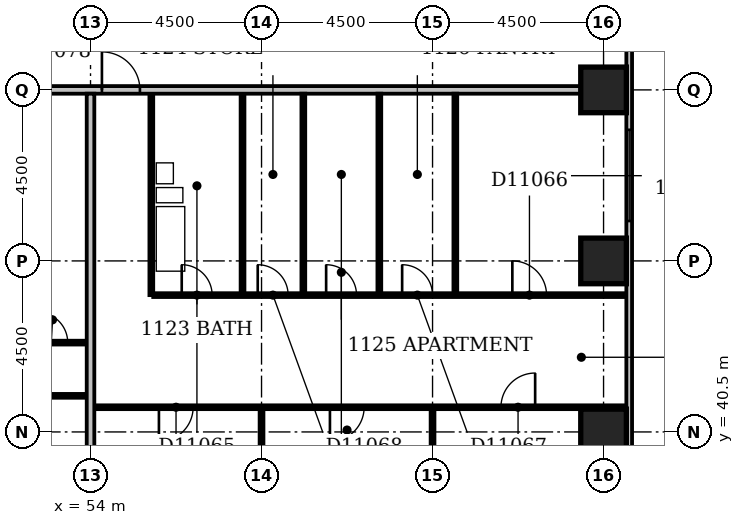
"""IFC4 building model, lengths in metres.
Left out: names, types, materials, properties, quantities, classifications, styles, units other than length and angle.
Written with IfcOpenShell. Run it as: python <this file> out.ifc"""

import sys

from ifc_helpers import new_model, si_unit, direction, frame, frame_2d, origin, origin_2d, place, context, subcontext, project, spatial, rectangle, extrude, element, fill, save


model = new_model("IFC4")
c1 = context("Model", 3, precision=1e-05, world=origin(), true_north=direction((0.0, 1.0)))
c2 = subcontext(c1, "Body", "Model", "MODEL_VIEW")
j1 = project(units=[si_unit("LENGTHUNIT", "METRE"), si_unit("PLANEANGLEUNIT", "RADIAN")], contexts=[c1])
p1 = place(None, origin())
s1 = spatial("IfcSite", under=j1, at=p1, CompositionType="ELEMENT")
p2 = place(p1, origin())
s2 = spatial("IfcBuilding", under=s1, at=p2, CompositionType="ELEMENT")
p3 = place(p2, frame((0.0, 0.0, 50.6)))
s3 = spatial("IfcBuildingStorey", under=s2, at=p3, CompositionType="ELEMENT", Elevation=50.6)
for number, where, z_axis, x_axis in (
    (1, (67.5, 40.5, -0.3), (0.0, 0.0, 1.0), (1.0, 0.0, 0.0)),
    (2, (67.5, 45.0, -0.3), (0.0, 0.0, 1.0), (1.0, 0.0, 0.0)),
    (3, (67.5, 49.5, -0.3), (0.0, 0.0, 1.0), (1.0, 0.0, 0.0)),
):
    element("IfcColumn", number, at=place(p3, frame(where, z_axis=z_axis, x_axis=x_axis)), inside=s3, PredefinedType="COLUMN", context=c2, shape_type="SweptSolid", body=[
        extrude(rectangle(XDim=1.2, YDim=1.2, at=origin_2d()), origin(), (0.0, 0.0, 1.0), 3.6),
    ])
p4 = place(p3, frame((68.175, 35.4, 0.0), z_axis=(0.0, 0.0, 1.0), x_axis=(0.0, 1.0, 0.0)))
e4 = element("IfcWall", 4, at=p4, inside=s3, PredefinedType="STANDARD", context=c2, shape_type="SweptSolid", body=[
    extrude(rectangle(XDim=23.85, YDim=0.15, at=frame_2d((11.925, 0.0))), origin(), (0.0, 0.0, 1.0), 2.7),
])
p5 = place(p4, frame((2.977, 0.0, 0.6)))
e5 = element("IfcOpeningElement", 5, at=p5, cuts=e4, PredefinedType="OPENING", context=c2, shape_type="SweptSolid", body=[
    extrude(rectangle(XDim=1.2, YDim=1.8, at=frame_2d((0.6, 0.9))), frame((0.0, 0.087, 0.0), z_axis=(0.0, -1.0, 0.0), x_axis=(1.0, 0.0, 0.0)), (0.0, 0.0, 1.0), 0.174),
])
p6 = place(p4, frame((10.65, 0.0, 0.6)))
e6 = element("IfcOpeningElement", 6, at=p6, cuts=e4, PredefinedType="OPENING", context=c2, shape_type="SweptSolid", body=[
    extrude(rectangle(XDim=2.4, YDim=1.8, at=frame_2d((1.2, 0.9))), frame((0.0, 0.087, 0.0), z_axis=(0.0, -1.0, 0.0), x_axis=(1.0, 0.0, 0.0)), (0.0, 0.0, 1.0), 0.174),
])
p7 = place(p4, frame((19.545, 0.0, 0.6)))
e7 = element("IfcOpeningElement", 7, at=p7, cuts=e4, PredefinedType="OPENING", context=c2, shape_type="SweptSolid", body=[
    extrude(rectangle(XDim=1.8, YDim=1.8, at=frame_2d((0.9, 0.9))), frame((0.0, 0.087, 0.0), z_axis=(0.0, -1.0, 0.0), x_axis=(1.0, 0.0, 0.0)), (0.0, 0.0, 1.0), 0.174),
])
p8 = place(p3, frame((54.0, 36.6, 0.0), z_axis=(0.0, 0.0, 1.0), x_axis=(0.0, 1.0, 0.0)))
e8 = element("IfcWall", 8, at=p8, inside=s3, PredefinedType="PARTITIONING", context=c2, shape_type="SweptSolid", body=[
    extrude(rectangle(XDim=12.8, YDim=0.2, at=frame_2d((6.4, 0.0))), origin(), (0.0, 0.0, 1.0), 2.6),
])
p9 = place(p3, frame((58.5, 36.6, 0.0), z_axis=(0.0, 0.0, 1.0), x_axis=(0.0, 1.0, 0.0)))
e9 = element("IfcWall", 9, at=p9, inside=s3, PredefinedType="PARTITIONING", context=c2, shape_type="SweptSolid", body=[
    extrude(rectangle(XDim=4.5, YDim=0.1, at=frame_2d((2.25, 0.0))), origin(), (0.0, 0.0, 1.0), 3.3),
])
p10 = place(p3, frame((63.0, 36.6, 0.0), z_axis=(0.0, 0.0, 1.0), x_axis=(0.0, 1.0, 0.0)))
e10 = element("IfcWall", 10, at=p10, inside=s3, PredefinedType="PARTITIONING", context=c2, shape_type="SweptSolid", body=[
    extrude(rectangle(XDim=4.5, YDim=0.1, at=frame_2d((2.25, 0.0))), origin(), (0.0, 0.0, 1.0), 2.4),
])
p11 = place(p3, frame((54.1, 41.15, 0.0), z_axis=(0.0, 0.0, 1.0), x_axis=(1.0, 0.0, 0.0)))
e11 = element("IfcWall", 11, at=p11, inside=s3, PredefinedType="PARTITIONING", context=c2, shape_type="SweptSolid", body=[
    extrude(rectangle(XDim=14.0, YDim=0.1, at=frame_2d((7.0, 0.0))), origin(), (0.0, 0.0, 1.0), 3.3),
])
p12 = place(p11, frame((1.7, 0.0, 0.0)))
e12 = element("IfcOpeningElement", 12, at=p12, cuts=e11, PredefinedType="OPENING", context=c2, shape_type="SweptSolid", body=[
    extrude(rectangle(XDim=0.9, YDim=2.1, at=frame_2d((0.45, 1.05))), frame((0.0, 0.062, 0.0), z_axis=(0.0, -1.0, 0.0), x_axis=(1.0, 0.0, 0.0)), (0.0, 0.0, 1.0), 0.124),
])
p13 = place(p11, frame((6.2, 0.0, 0.0)))
e13 = element("IfcOpeningElement", 13, at=p13, cuts=e11, PredefinedType="OPENING", context=c2, shape_type="SweptSolid", body=[
    extrude(rectangle(XDim=0.9, YDim=2.1, at=frame_2d((0.45, 1.05))), frame((0.0, 0.062, 0.0), z_axis=(0.0, -1.0, 0.0), x_axis=(1.0, 0.0, 0.0)), (0.0, 0.0, 1.0), 0.124),
])
p14 = place(p11, frame((10.7, 0.0, 0.0)))
e14 = element("IfcOpeningElement", 14, at=p14, cuts=e11, PredefinedType="OPENING", context=c2, shape_type="SweptSolid", body=[
    extrude(rectangle(XDim=0.9, YDim=2.1, at=frame_2d((0.45, 1.05))), frame((0.0, 0.062, 0.0), z_axis=(0.0, -1.0, 0.0), x_axis=(1.0, 0.0, 0.0)), (0.0, 0.0, 1.0), 0.124),
])
p15 = place(p3, frame((40.6, 41.45, 0.0), z_axis=(0.0, 0.0, 1.0), x_axis=(1.0, 0.0, 0.0)))
e15 = element("IfcWall", 15, at=p15, inside=s3, PredefinedType="PARTITIONING", context=c2, shape_type="SweptSolid", body=[
    extrude(rectangle(XDim=13.3, YDim=0.1, at=frame_2d((6.65, 0.0))), origin(), (0.0, 0.0, 1.0), 3.3),
])
p16 = place(p15, frame((1.7, 0.0, 0.0)))
e16 = element("IfcOpeningElement", 16, at=p16, cuts=e15, PredefinedType="OPENING", context=c2, shape_type="SweptSolid", body=[
    extrude(rectangle(XDim=0.9, YDim=2.1, at=frame_2d((0.45, 1.05))), frame((0.0, 0.062, 0.0), z_axis=(0.0, -1.0, 0.0), x_axis=(1.0, 0.0, 0.0)), (0.0, 0.0, 1.0), 0.124),
])
p17 = place(p15, frame((6.2, 0.0, 0.0)))
e17 = element("IfcOpeningElement", 17, at=p17, cuts=e15, PredefinedType="OPENING", context=c2, shape_type="SweptSolid", body=[
    extrude(rectangle(XDim=0.9, YDim=2.1, at=frame_2d((0.45, 1.05))), frame((0.0, 0.062, 0.0), z_axis=(0.0, -1.0, 0.0), x_axis=(1.0, 0.0, 0.0)), (0.0, 0.0, 1.0), 0.124),
])
p18 = place(p15, frame((10.7, 0.0, 0.0)))
e18 = element("IfcOpeningElement", 18, at=p18, cuts=e15, PredefinedType="OPENING", context=c2, shape_type="SweptSolid", body=[
    extrude(rectangle(XDim=0.9, YDim=2.1, at=frame_2d((0.45, 1.05))), frame((0.0, 0.062, 0.0), z_axis=(0.0, -1.0, 0.0), x_axis=(1.0, 0.0, 0.0)), (0.0, 0.0, 1.0), 0.124),
])
p19 = place(p3, frame((50.45, 42.85, 0.0), z_axis=(0.0, 0.0, 1.0), x_axis=(1.0, 0.0, 0.0)))
e19 = element("IfcWall", 19, at=p19, inside=s3, PredefinedType="PARTITIONING", context=c2, shape_type="SweptSolid", body=[
    extrude(rectangle(XDim=3.45, YDim=0.1, at=frame_2d((1.725, 0.0))), origin(), (0.0, 0.0, 1.0), 3.3),
])
p20 = place(p19, frame((0.35, 0.0, 0.0)))
e20 = element("IfcOpeningElement", 20, at=p20, cuts=e19, PredefinedType="OPENING", context=c2, shape_type="SweptSolid", body=[
    extrude(rectangle(XDim=0.8, YDim=2.1, at=frame_2d((0.4, 1.05))), frame((0.0, 0.062, 0.0), z_axis=(0.0, -1.0, 0.0), x_axis=(1.0, 0.0, 0.0)), (0.0, 0.0, 1.0), 0.124),
])
p21 = place(p19, frame((2.15, 0.0, 0.0)))
e21 = element("IfcOpeningElement", 21, at=p21, cuts=e19, PredefinedType="OPENING", context=c2, shape_type="SweptSolid", body=[
    extrude(rectangle(XDim=0.8, YDim=2.1, at=frame_2d((0.4, 1.05))), frame((0.0, 0.062, 0.0), z_axis=(0.0, -1.0, 0.0), x_axis=(1.0, 0.0, 0.0)), (0.0, 0.0, 1.0), 0.124),
])
p22 = place(p3, frame((55.6, 44.1, 0.0), z_axis=(0.0, 0.0, 1.0), x_axis=(0.0, 1.0, 0.0)))
e22 = element("IfcWall", 22, at=p22, inside=s3, PredefinedType="PLUMBINGWALL", context=c2, shape_type="SweptSolid", body=[
    extrude(rectangle(XDim=5.3, YDim=0.1, at=frame_2d((2.65, 0.0))), origin(), (0.0, 0.0, 1.0), 3.3),
])
p23 = place(p3, frame((55.65, 44.1, 0.0), z_axis=(0.0, 0.0, 1.0), x_axis=(1.0, 0.0, 0.0)))
e23 = element("IfcWall", 23, at=p23, inside=s3, PredefinedType="PARTITIONING", context=c2, shape_type="SweptSolid", body=[
    extrude(rectangle(XDim=12.45, YDim=0.1, at=frame_2d((6.225, 0.0))), origin(), (0.0, 0.0, 1.0), 3.3),
])
p24 = place(p23, frame((0.75, 0.0, 0.0)))
e24 = element("IfcOpeningElement", 24, at=p24, cuts=e23, PredefinedType="OPENING", context=c2, shape_type="SweptSolid", body=[
    extrude(rectangle(XDim=0.8, YDim=2.1, at=frame_2d((0.4, 1.05))), frame((0.0, 0.062, 0.0), z_axis=(0.0, -1.0, 0.0), x_axis=(1.0, 0.0, 0.0)), (0.0, 0.0, 1.0), 0.124),
])
p25 = place(p23, frame((9.45, 0.0, 0.0)))
e25 = element("IfcOpeningElement", 25, at=p25, cuts=e23, PredefinedType="OPENING", context=c2, shape_type="SweptSolid", body=[
    extrude(rectangle(XDim=0.9, YDim=2.1, at=frame_2d((0.45, 1.05))), frame((0.0, 0.062, 0.0), z_axis=(0.0, -1.0, 0.0), x_axis=(1.0, 0.0, 0.0)), (0.0, 0.0, 1.0), 0.124),
])
p26 = place(p23, frame((6.55, 0.0, 0.0)))
e26 = element("IfcOpeningElement", 26, at=p26, cuts=e23, PredefinedType="OPENING", context=c2, shape_type="SweptSolid", body=[
    extrude(rectangle(XDim=0.8, YDim=2.1, at=frame_2d((0.4, 1.05))), frame((0.0, 0.062, 0.0), z_axis=(0.0, -1.0, 0.0), x_axis=(1.0, 0.0, 0.0)), (0.0, 0.0, 1.0), 0.124),
])
p27 = place(p23, frame((2.75, 0.0, 0.0)))
e27 = element("IfcOpeningElement", 27, at=p27, cuts=e23, PredefinedType="OPENING", context=c2, shape_type="SweptSolid", body=[
    extrude(rectangle(XDim=0.8, YDim=2.1, at=frame_2d((0.4, 1.05))), frame((0.0, 0.062, 0.0), z_axis=(0.0, -1.0, 0.0), x_axis=(1.0, 0.0, 0.0)), (0.0, 0.0, 1.0), 0.124),
])
p28 = place(p23, frame((4.55, 0.0, 0.0)))
e28 = element("IfcOpeningElement", 28, at=p28, cuts=e23, PredefinedType="OPENING", context=c2, shape_type="SweptSolid", body=[
    extrude(rectangle(XDim=0.8, YDim=2.1, at=frame_2d((0.4, 1.05))), frame((0.0, 0.062, 0.0), z_axis=(0.0, -1.0, 0.0), x_axis=(1.0, 0.0, 0.0)), (0.0, 0.0, 1.0), 0.124),
])
p29 = place(p3, frame((58.0, 44.15, 0.0), z_axis=(0.0, 0.0, 1.0), x_axis=(0.0, 1.0, 0.0)))
e29 = element("IfcWall", 29, at=p29, inside=s3, PredefinedType="PLUMBINGWALL", context=c2, shape_type="SweptSolid", body=[
    extrude(rectangle(XDim=5.25, YDim=0.1, at=frame_2d((2.625, 0.0))), origin(), (0.0, 0.0, 1.0), 3.3),
])
for number, where, z_axis, x_axis in (
    (30, (59.6, 44.15, 0.0), (0.0, 0.0, 1.0), (0.0, 1.0, 0.0)),
    (31, (61.6, 44.15, 0.0), (0.0, 0.0, 1.0), (0.0, 1.0, 0.0)),
):
    element("IfcWall", number, at=place(p3, frame(where, z_axis=z_axis, x_axis=x_axis)), inside=s3, PredefinedType="PARTITIONING", context=c2, shape_type="SweptSolid", body=[
        extrude(rectangle(XDim=5.25, YDim=0.1, at=frame_2d((2.625, 0.0))), origin(), (0.0, 0.0, 1.0), 3.3),
    ])
p30 = place(p3, frame((63.6, 44.15, 0.0), z_axis=(0.0, 0.0, 1.0), x_axis=(0.0, 1.0, 0.0)))
e32 = element("IfcWall", 32, at=p30, inside=s3, PredefinedType="PARTITIONING", context=c2, shape_type="SweptSolid", body=[
    extrude(rectangle(XDim=5.25, YDim=0.1, at=frame_2d((2.625, 0.0))), origin(), (0.0, 0.0, 1.0), 2.4),
])
p31 = place(p3, frame((9.1, 49.5, 0.0), z_axis=(0.0, 0.0, 1.0), x_axis=(1.0, 0.0, 0.0)))
e33 = element("IfcWall", 33, at=p31, inside=s3, PredefinedType="PARTITIONING", context=c2, shape_type="SweptSolid", body=[
    extrude(rectangle(XDim=57.8, YDim=0.2, at=frame_2d((28.9, 0.0))), origin(), (0.0, 0.0, 1.0), 3.3),
])
p32 = place(p31, frame((16.1, 0.0, 0.0)))
e34 = element("IfcOpeningElement", 34, at=p32, cuts=e33, PredefinedType="OPENING", context=c2, shape_type="SweptSolid", body=[
    extrude(rectangle(XDim=1.0, YDim=2.1, at=frame_2d((0.5, 1.05))), frame((0.0, 0.112, 0.0), z_axis=(0.0, -1.0, 0.0), x_axis=(1.0, 0.0, 0.0)), (0.0, 0.0, 1.0), 0.224),
])
p33 = place(p31, frame((40.0, 0.0, 0.0)))
e35 = element("IfcOpeningElement", 35, at=p33, cuts=e33, PredefinedType="OPENING", context=c2, shape_type="SweptSolid", body=[
    extrude(rectangle(XDim=1.0, YDim=2.1, at=frame_2d((0.5, 1.05))), frame((0.0, 0.112, 0.0), z_axis=(0.0, -1.0, 0.0), x_axis=(1.0, 0.0, 0.0)), (0.0, 0.0, 1.0), 0.224),
])
p34 = place(p31, frame((45.2, 0.0, 0.0)))
e36 = element("IfcOpeningElement", 36, at=p34, cuts=e33, PredefinedType="OPENING", context=c2, shape_type="SweptSolid", body=[
    extrude(rectangle(XDim=1.0, YDim=2.1, at=frame_2d((0.5, 1.05))), frame((0.0, 0.112, 0.0), z_axis=(0.0, -1.0, 0.0), x_axis=(1.0, 0.0, 0.0)), (0.0, 0.0, 1.0), 0.224),
])
p35 = place(p31, frame((3.9, 0.0, 0.0)))
e37 = element("IfcOpeningElement", 37, at=p35, cuts=e33, PredefinedType="OPENING", context=c2, shape_type="SweptSolid", body=[
    extrude(rectangle(XDim=0.9, YDim=2.1, at=frame_2d((0.45, 1.05))), frame((0.0, 0.112, 0.0), z_axis=(0.0, -1.0, 0.0), x_axis=(1.0, 0.0, 0.0)), (0.0, 0.0, 1.0), 0.224),
])
p36 = place(p6, origin())
e38 = element("IfcWindow", 38, at=p36, inside=s3, PartitioningType="SINGLE_PANEL", PredefinedType="WINDOW", context=c2, shape_type="SweptSolid", body=[
    extrude(rectangle(XDim=2.4, YDim=1.8, at=frame_2d((1.2, 0.9))), frame((0.0, 0.03, 0.0), z_axis=(0.0, -1.0, 0.0), x_axis=(1.0, 0.0, 0.0)), (0.0, 0.0, 1.0), 0.06),
])
fill(e6, e38)
p37 = place(p12, frame((0.9, 0.0, 0.0), z_axis=(0.0, 0.0, 1.0), x_axis=(-1.0, 0.0, 0.0)))
e39 = element("IfcDoor", 39, at=p37, inside=s3, OperationType="SINGLE_SWING_RIGHT", PredefinedType="DOOR", context=c2, shape_type="SweptSolid", body=[
    extrude(rectangle(XDim=0.9, YDim=2.1, at=frame_2d((0.45, 1.05))), frame((0.0, 0.025, 0.0), z_axis=(0.0, -1.0, 0.0), x_axis=(1.0, 0.0, 0.0)), (0.0, 0.0, 1.0), 0.05),
])
fill(e12, e39)
p38 = place(p13, frame((0.9, 0.0, 0.0), z_axis=(0.0, 0.0, 1.0), x_axis=(-1.0, 0.0, 0.0)))
e40 = element("IfcDoor", 40, at=p38, inside=s3, OperationType="SINGLE_SWING_RIGHT", PredefinedType="DOOR", context=c2, shape_type="SweptSolid", body=[
    extrude(rectangle(XDim=0.9, YDim=2.1, at=frame_2d((0.45, 1.05))), frame((0.0, 0.025, 0.0), z_axis=(0.0, -1.0, 0.0), x_axis=(1.0, 0.0, 0.0)), (0.0, 0.0, 1.0), 0.05),
])
fill(e13, e40)
p39 = place(p14, frame((0.9, 0.0, 0.0), z_axis=(0.0, 0.0, 1.0), x_axis=(-1.0, 0.0, 0.0)))
e41 = element("IfcDoor", 41, at=p39, inside=s3, OperationType="SINGLE_SWING_LEFT", PredefinedType="DOOR", context=c2, shape_type="SweptSolid", body=[
    extrude(rectangle(XDim=0.9, YDim=2.1, at=frame_2d((0.45, 1.05))), frame((0.0, 0.025, 0.0), z_axis=(0.0, -1.0, 0.0), x_axis=(1.0, 0.0, 0.0)), (0.0, 0.0, 1.0), 0.05),
])
fill(e14, e41)
p40 = place(p21, origin())
e42 = element("IfcDoor", 42, at=p40, inside=s3, OperationType="SINGLE_SWING_LEFT", PredefinedType="DOOR", context=c2, shape_type="SweptSolid", body=[
    extrude(rectangle(XDim=0.8, YDim=2.1, at=frame_2d((0.4, 1.05))), frame((0.0, 0.025, 0.0), z_axis=(0.0, -1.0, 0.0), x_axis=(1.0, 0.0, 0.0)), (0.0, 0.0, 1.0), 0.05),
])
fill(e21, e42)
p41 = place(p24, origin())
e43 = element("IfcDoor", 43, at=p41, inside=s3, OperationType="SINGLE_SWING_LEFT", PredefinedType="DOOR", context=c2, shape_type="SweptSolid", body=[
    extrude(rectangle(XDim=0.8, YDim=2.1, at=frame_2d((0.4, 1.05))), frame((0.0, 0.025, 0.0), z_axis=(0.0, -1.0, 0.0), x_axis=(1.0, 0.0, 0.0)), (0.0, 0.0, 1.0), 0.05),
])
fill(e24, e43)
p42 = place(p25, origin())
e44 = element("IfcDoor", 44, at=p42, inside=s3, OperationType="SINGLE_SWING_LEFT", PredefinedType="DOOR", context=c2, shape_type="SweptSolid", body=[
    extrude(rectangle(XDim=0.9, YDim=2.1, at=frame_2d((0.45, 1.05))), frame((0.0, 0.025, 0.0), z_axis=(0.0, -1.0, 0.0), x_axis=(1.0, 0.0, 0.0)), (0.0, 0.0, 1.0), 0.05),
])
fill(e25, e44)
p43 = place(p26, origin())
e45 = element("IfcDoor", 45, at=p43, inside=s3, OperationType="SINGLE_SWING_LEFT", PredefinedType="DOOR", context=c2, shape_type="SweptSolid", body=[
    extrude(rectangle(XDim=0.8, YDim=2.1, at=frame_2d((0.4, 1.05))), frame((0.0, 0.025, 0.0), z_axis=(0.0, -1.0, 0.0), x_axis=(1.0, 0.0, 0.0)), (0.0, 0.0, 1.0), 0.05),
])
fill(e26, e45)
p44 = place(p27, origin())
e46 = element("IfcDoor", 46, at=p44, inside=s3, OperationType="SINGLE_SWING_LEFT", PredefinedType="DOOR", context=c2, shape_type="SweptSolid", body=[
    extrude(rectangle(XDim=0.8, YDim=2.1, at=frame_2d((0.4, 1.05))), frame((0.0, 0.025, 0.0), z_axis=(0.0, -1.0, 0.0), x_axis=(1.0, 0.0, 0.0)), (0.0, 0.0, 1.0), 0.05),
])
fill(e27, e46)
p45 = place(p28, origin())
e47 = element("IfcDoor", 47, at=p45, inside=s3, OperationType="SINGLE_SWING_LEFT", PredefinedType="DOOR", context=c2, shape_type="SweptSolid", body=[
    extrude(rectangle(XDim=0.8, YDim=2.1, at=frame_2d((0.4, 1.05))), frame((0.0, 0.025, 0.0), z_axis=(0.0, -1.0, 0.0), x_axis=(1.0, 0.0, 0.0)), (0.0, 0.0, 1.0), 0.05),
])
fill(e28, e47)
p46 = place(p34, origin())
e48 = element("IfcDoor", 48, at=p46, inside=s3, OperationType="SINGLE_SWING_LEFT", PredefinedType="DOOR", context=c2, shape_type="SweptSolid", body=[
    extrude(rectangle(XDim=1.0, YDim=2.1, at=frame_2d((0.5, 1.05))), frame((0.0, 0.025, 0.0), z_axis=(0.0, -1.0, 0.0), x_axis=(1.0, 0.0, 0.0)), (0.0, 0.0, 1.0), 0.05),
])
fill(e36, e48)
save(model, sys.argv[1])
